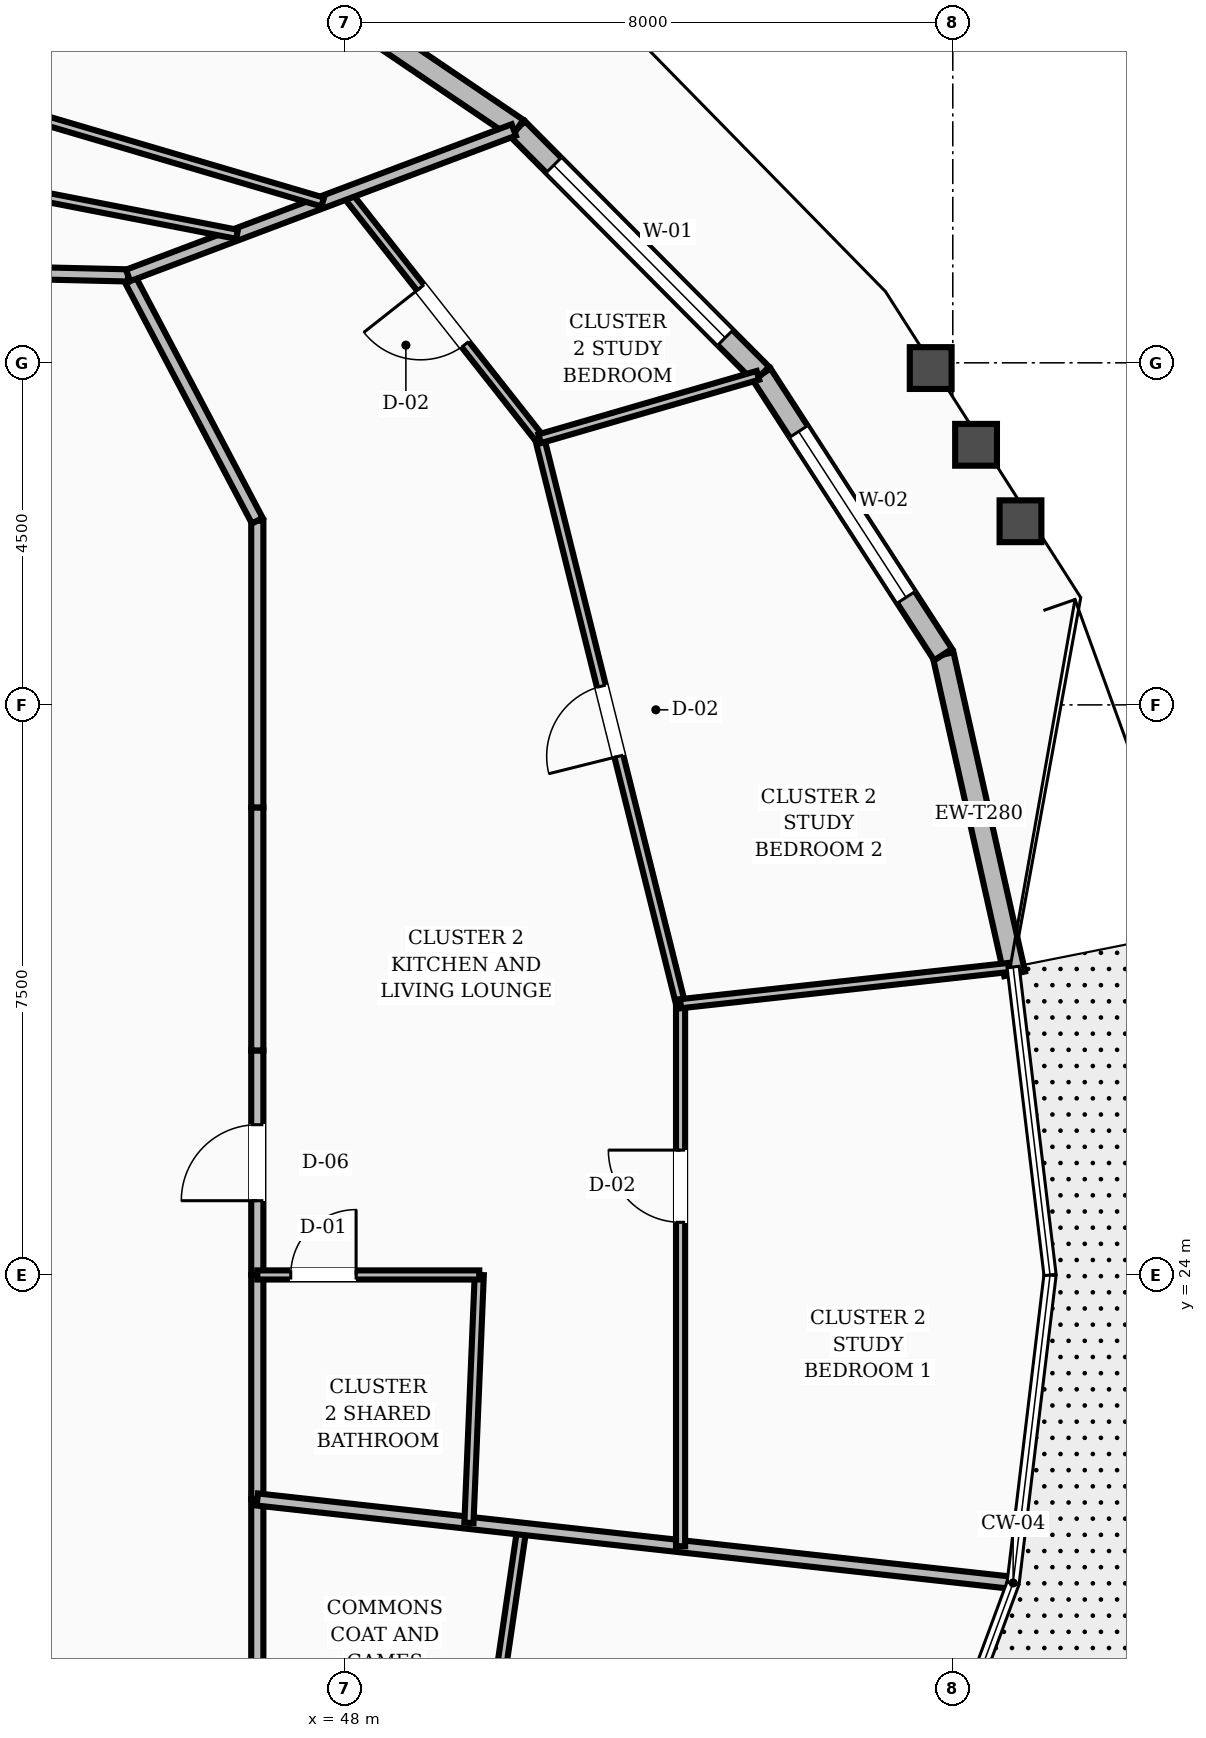
"""IFC4 building model, lengths in metres.
Left out: names, types, materials, properties, quantities, classifications, styles, units other than length and angle.
Written with IfcOpenShell. Run it as: python <this file> out.ifc"""

import sys

from ifc_helpers import new_model, si_unit, direction, frame, frame_2d, origin, place, context, subcontext, project, spatial, rectangle, extrude, element, fill, save


model = new_model("IFC4")
c1 = context("Model", 3, precision=1e-05, world=origin(), true_north=direction((0.0, 1.0)))
c2 = subcontext(c1, "Body", "Model", "MODEL_VIEW")
j1 = project(units=[si_unit("LENGTHUNIT", "METRE"), si_unit("PLANEANGLEUNIT", "RADIAN")], contexts=[c1])
p1 = place(None, origin())
s1 = spatial("IfcSite", under=j1, at=p1, CompositionType="ELEMENT")
p2 = place(p1, origin())
s2 = spatial("IfcBuilding", under=s1, at=p2, CompositionType="ELEMENT")
p3 = place(p2, frame((0.0, 0.0, 178.4)))
s3 = spatial("IfcBuildingStorey", under=s2, at=p3, CompositionType="ELEMENT", Elevation=178.4)
p4 = place(p3, frame((56.814, 27.962, 0.0), z_axis=(0.0, 0.0, 1.0), x_axis=(-0.218719837565, 0.975787698557, 0.0)))
e1 = element("IfcWall", 1, at=p4, inside=s3, PredefinedType="STANDARD", context=c2, shape_type="SweptSolid", body=[
    extrude(rectangle(XDim=4.304, YDim=0.28, at=frame_2d((2.152, 0.0))), origin(), (0.0, 0.0, 1.0), 2.82),
])
p5 = place(p3, frame((55.873, 32.162, 0.0), z_axis=(0.0, 0.0, 1.0), x_axis=(-0.543543905956, 0.839380737388, 0.0)))
e2 = element("IfcWall", 2, at=p5, inside=s3, PredefinedType="STANDARD", context=c2, shape_type="SweptSolid", body=[
    extrude(rectangle(XDim=4.393, YDim=0.28, at=frame_2d((2.196, 0.0))), origin(), (0.0, 0.0, 1.0), 2.82),
])
p6 = place(p5, frame((0.896, 0.0, 0.8)))
e3 = element("IfcOpeningElement", 3, at=p6, cuts=e2, PredefinedType="OPENING", context=c2, shape_type="SweptSolid", body=[
    extrude(rectangle(XDim=2.6, YDim=1.65, at=frame_2d((1.3, 0.825))), frame((0.0, 0.15, 0.0), z_axis=(0.0, -1.0, 0.0), x_axis=(1.0, 0.0, 0.0)), (0.0, 0.0, 1.0), 0.3),
])
p7 = place(p3, frame((53.485, 35.849, 0.0), z_axis=(0.0, 0.0, 1.0), x_axis=(-0.705095186085, 0.709112669862, 0.0)))
e4 = element("IfcWall", 4, at=p7, inside=s3, PredefinedType="STANDARD", context=c2, shape_type="SweptSolid", body=[
    extrude(rectangle(XDim=4.558, YDim=0.28, at=frame_2d((2.279, 0.0))), origin(), (0.0, 0.0, 1.0), 2.82),
])
p8 = place(p7, frame((0.679, 0.0, 0.8)))
e5 = element("IfcOpeningElement", 5, at=p8, cuts=e4, PredefinedType="OPENING", context=c2, shape_type="SweptSolid", body=[
    extrude(rectangle(XDim=3.2, YDim=1.65, at=frame_2d((1.6, 0.825))), frame((0.0, 0.15, 0.0), z_axis=(0.0, -1.0, 0.0), x_axis=(1.0, 0.0, 0.0)), (0.0, 0.0, 1.0), 0.3),
])
p9 = place(p3, frame((50.271, 39.081, 0.0), z_axis=(0.0, 0.0, 1.0), x_axis=(-0.827929515697, 0.560832164767, 0.0)))
e6 = element("IfcWall", 6, at=p9, inside=s3, PredefinedType="STANDARD", context=c2, shape_type="SweptSolid", body=[
    extrude(rectangle(XDim=4.729, YDim=0.28, at=frame_2d((2.365, 0.0))), origin(), (0.0, 0.0, 1.0), 2.82),
])
p10 = place(p3, frame((46.85, 24.0, 0.0), z_axis=(0.0, 0.0, 1.0), x_axis=(0.0, 1.0, 0.0)))
e7 = element("IfcWall", 7, at=p10, inside=s3, PredefinedType="SOLIDWALL", context=c2, shape_type="SweptSolid", body=[
    extrude(rectangle(XDim=2.954, YDim=0.16, at=frame_2d((1.477, 0.0))), origin(), (0.0, 0.0, 1.0), 2.8),
])
p11 = place(p10, frame((0.977, 0.0, 0.0)))
e8 = element("IfcOpeningElement", 8, at=p11, cuts=e7, PredefinedType="OPENING", context=c2, shape_type="SweptSolid", body=[
    extrude(rectangle(XDim=1.0, YDim=2.1, at=frame_2d((0.5, 1.05))), frame((0.0, 0.09, 0.0), z_axis=(0.0, -1.0, 0.0), x_axis=(1.0, 0.0, 0.0)), (0.0, 0.0, 1.0), 0.18),
])
p12 = place(p3, frame((46.85, 26.954, 0.0), z_axis=(0.0, 0.0, 1.0), x_axis=(0.0, 1.0, 0.0)))
e9 = element("IfcWall", 9, at=p12, inside=s3, PredefinedType="SOLIDWALL", context=c2, shape_type="SweptSolid", body=[
    extrude(rectangle(XDim=3.197, YDim=0.16, at=frame_2d((1.599, 0.0))), origin(), (0.0, 0.0, 1.0), 2.8),
])
p13 = place(p3, frame((46.85, 30.151, 0.0), z_axis=(0.0, 0.0, 1.0), x_axis=(0.0, 1.0, 0.0)))
e10 = element("IfcWall", 10, at=p13, inside=s3, PredefinedType="SOLIDWALL", context=c2, shape_type="SweptSolid", body=[
    extrude(rectangle(XDim=3.771, YDim=0.16, at=frame_2d((1.886, 0.0))), origin(), (0.0, 0.0, 1.0), 2.8),
])
p14 = place(p3, frame((46.85, 33.923, 0.0), z_axis=(0.0, 0.0, 1.0), x_axis=(-0.466093963429, 0.884735224378, 0.0)))
e11 = element("IfcWall", 11, at=p14, inside=s3, PredefinedType="SOLIDWALL", context=c2, shape_type="SweptSolid", body=[
    extrude(rectangle(XDim=3.648, YDim=0.16, at=frame_2d((1.824, 0.0))), origin(), (0.0, 0.0, 1.0), 2.8),
])
p15 = place(p3, frame((45.15, 37.15, 0.0), z_axis=(0.0, 0.0, 1.0), x_axis=(-0.999728709658, 0.023291781507, 0.0)))
e12 = element("IfcWall", 12, at=p15, inside=s3, PredefinedType="SOLIDWALL", context=c2, shape_type="SweptSolid", body=[
    extrude(rectangle(XDim=4.298, YDim=0.16, at=frame_2d((2.149, 0.0))), origin(), (0.0, 0.0, 1.0), 2.8),
])
p16 = place(p3, frame((46.85, 17.849, 0.0), z_axis=(0.0, 0.0, 1.0), x_axis=(0.0, 1.0, 0.0)))
e13 = element("IfcWall", 13, at=p16, inside=s3, PredefinedType="SOLIDWALL", context=c2, shape_type="SweptSolid", body=[
    extrude(rectangle(XDim=3.197, YDim=0.16, at=frame_2d((1.599, 0.0))), origin(), (0.0, 0.0, 1.0), 2.8),
])
p17 = place(p3, frame((46.85, 21.046, 0.0), z_axis=(0.0, 0.0, 1.0), x_axis=(0.0, 1.0, 0.0)))
e14 = element("IfcWall", 14, at=p17, inside=s3, PredefinedType="SOLIDWALL", context=c2, shape_type="SweptSolid", body=[
    extrude(rectangle(XDim=2.954, YDim=0.16, at=frame_2d((1.477, 0.0))), origin(), (0.0, 0.0, 1.0), 2.8),
])
p18 = place(p3, frame((49.827, 17.22, 0.0), z_axis=(0.0, 0.0, 1.0), x_axis=(0.144722086216, 0.989472343101, 0.0)))
e15 = element("IfcWall", 15, at=p18, inside=s3, PredefinedType="PARTITIONING", context=c2, shape_type="SweptSolid", body=[
    extrude(rectangle(XDim=3.479, YDim=0.12, at=frame_2d((1.739, 0.0))), origin(), (0.0, 0.0, 1.0), 2.8),
])
p19 = place(p3, frame((46.85, 21.046, 0.0), z_axis=(0.0, 0.0, 1.0), x_axis=(0.99396125521, -0.109731595909, 0.0)))
e16 = element("IfcWall", 16, at=p19, inside=s3, PredefinedType="SOLIDWALL", context=c2, shape_type="SweptSolid", body=[
    extrude(rectangle(XDim=9.954, YDim=0.16, at=frame_2d((4.977, 0.0))), origin(), (0.0, 0.0, 1.0), 2.8),
])
p20 = place(p3, frame((49.634, 20.739, 0.0), z_axis=(0.0, 0.0, 1.0), x_axis=(0.041661655892, 0.999131776308, 0.0)))
e17 = element("IfcWall", 17, at=p20, inside=s3, PredefinedType="PARTITIONING", context=c2, shape_type="SweptSolid", body=[
    extrude(rectangle(XDim=3.264, YDim=0.12, at=frame_2d((1.632, 0.0))), origin(), (0.0, 0.0, 1.0), 2.8),
])
p21 = place(p3, frame((46.85, 24.0, 0.0), z_axis=(0.0, 0.0, 1.0), x_axis=(1.0, 0.0, 0.0)))
e18 = element("IfcWall", 18, at=p21, inside=s3, PredefinedType="PARTITIONING", context=c2, shape_type="SweptSolid", body=[
    extrude(rectangle(XDim=2.92, YDim=0.12, at=frame_2d((1.46, 0.0))), origin(), (0.0, 0.0, 1.0), 2.8),
])
p22 = place(p21, frame((0.44, 0.0, 0.0)))
e19 = element("IfcOpeningElement", 19, at=p22, cuts=e18, PredefinedType="OPENING", context=c2, shape_type="SweptSolid", body=[
    extrude(rectangle(XDim=0.86, YDim=2.1, at=frame_2d((0.43, 1.05))), frame((0.0, 0.07, 0.0), z_axis=(0.0, -1.0, 0.0), x_axis=(1.0, 0.0, 0.0)), (0.0, 0.0, 1.0), 0.14),
])
p23 = place(p3, frame((52.418, 20.431, 0.0), z_axis=(0.0, 0.0, 1.0), x_axis=(0.0, 1.0, 0.0)))
e20 = element("IfcWall", 20, at=p23, inside=s3, PredefinedType="PARTITIONING", context=c2, shape_type="SweptSolid", body=[
    extrude(rectangle(XDim=7.137, YDim=0.12, at=frame_2d((3.569, 0.0))), origin(), (0.0, 0.0, 1.0), 2.8),
])
p24 = place(p23, frame((4.261, 0.0, 0.0)))
e21 = element("IfcOpeningElement", 21, at=p24, cuts=e20, PredefinedType="OPENING", context=c2, shape_type="SweptSolid", body=[
    extrude(rectangle(XDim=0.95, YDim=2.1, at=frame_2d((0.475, 1.05))), frame((0.0, 0.07, 0.0), z_axis=(0.0, -1.0, 0.0), x_axis=(1.0, 0.0, 0.0)), (0.0, 0.0, 1.0), 0.14),
])
p25 = place(p3, frame((52.418, 27.569, 0.0), z_axis=(0.0, 0.0, 1.0), x_axis=(-0.24189815988, 0.970301643947, 0.0)))
e22 = element("IfcWall", 22, at=p25, inside=s3, PredefinedType="PARTITIONING", context=c2, shape_type="SweptSolid", body=[
    extrude(rectangle(XDim=7.66, YDim=0.12, at=frame_2d((3.83, 0.0))), origin(), (0.0, 0.0, 1.0), 2.8),
])
p26 = place(p25, frame((3.355, 0.0, 0.0)))
e23 = element("IfcOpeningElement", 23, at=p26, cuts=e22, PredefinedType="OPENING", context=c2, shape_type="SweptSolid", body=[
    extrude(rectangle(XDim=0.95, YDim=2.1, at=frame_2d((0.475, 1.05))), frame((0.0, 0.07, 0.0), z_axis=(0.0, -1.0, 0.0), x_axis=(1.0, 0.0, 0.0)), (0.0, 0.0, 1.0), 0.14),
])
p27 = place(p3, frame((52.418, 27.569, 0.0), z_axis=(0.0, 0.0, 1.0), x_axis=(0.993961478056, 0.109729577327, 0.0)))
e24 = element("IfcWall", 24, at=p27, inside=s3, PredefinedType="PARTITIONING", context=c2, shape_type="SweptSolid", body=[
    extrude(rectangle(XDim=4.352, YDim=0.12, at=frame_2d((2.176, 0.0))), origin(), (0.0, 0.0, 1.0), 2.8),
])
p28 = place(p3, frame((50.565, 35.001, 0.0), z_axis=(0.0, 0.0, 1.0), x_axis=(-0.619288242801, 0.785163723263, 0.0)))
e25 = element("IfcWall", 25, at=p28, inside=s3, PredefinedType="PARTITIONING", context=c2, shape_type="SweptSolid", body=[
    extrude(rectangle(XDim=4.114, YDim=0.12, at=frame_2d((2.057, 0.0))), origin(), (0.0, 0.0, 1.0), 2.8),
])
p29 = place(p28, frame((1.582, 0.0, 0.0)))
e26 = element("IfcOpeningElement", 26, at=p29, cuts=e25, PredefinedType="OPENING", context=c2, shape_type="SweptSolid", body=[
    extrude(rectangle(XDim=0.95, YDim=2.1, at=frame_2d((0.475, 1.05))), frame((0.0, 0.07, 0.0), z_axis=(0.0, -1.0, 0.0), x_axis=(1.0, 0.0, 0.0)), (0.0, 0.0, 1.0), 0.14),
])
p30 = place(p3, frame((50.565, 35.001, 0.0), z_axis=(0.0, 0.0, 1.0), x_axis=(0.960334941703, 0.278849062657, 0.0)))
e27 = element("IfcWall", 27, at=p30, inside=s3, PredefinedType="PARTITIONING", context=c2, shape_type="SweptSolid", body=[
    extrude(rectangle(XDim=2.99, YDim=0.12, at=frame_2d((1.495, 0.0))), origin(), (0.0, 0.0, 1.0), 2.8),
])
p31 = place(p3, frame((45.15, 37.15, 0.0), z_axis=(0.0, 0.0, 1.0), x_axis=(0.935687541553, 0.3528297388, 0.0)))
e28 = element("IfcWall", 28, at=p31, inside=s3, PredefinedType="SOLIDWALL", context=c2, shape_type="SweptSolid", body=[
    extrude(rectangle(XDim=5.424, YDim=0.16, at=frame_2d((2.712, 0.0))), origin(), (0.0, 0.0, 1.0), 2.8),
])
p32 = place(p3, frame((46.584, 37.691, 0.0), z_axis=(0.0, 0.0, 1.0), x_axis=(-0.981615985024, 0.190866597251, 0.0)))
e29 = element("IfcWall", 29, at=p32, inside=s3, PredefinedType="PARTITIONING", context=c2, shape_type="SweptSolid", body=[
    extrude(rectangle(XDim=4.268, YDim=0.12, at=frame_2d((2.134, 0.0))), origin(), (0.0, 0.0, 1.0), 2.8),
])
p33 = place(p3, frame((47.711, 38.115, 0.0), z_axis=(0.0, 0.0, 1.0), x_axis=(-0.959292020944, 0.282416038059, 0.0)))
e30 = element("IfcWall", 30, at=p33, inside=s3, PredefinedType="PARTITIONING", context=c2, shape_type="SweptSolid", body=[
    extrude(rectangle(XDim=8.363, YDim=0.12, at=frame_2d((4.181, 0.0))), origin(), (0.0, 0.0, 1.0), 2.8),
])
p34 = place(p33, frame((5.144, 0.0, 0.0)))
e31 = element("IfcOpeningElement", 31, at=p34, cuts=e30, PredefinedType="OPENING", context=c2, shape_type="SweptSolid", body=[
    extrude(rectangle(XDim=0.95, YDim=2.1, at=frame_2d((0.475, 1.05))), frame((0.0, 0.07, 0.0), z_axis=(0.0, -1.0, 0.0), x_axis=(1.0, 0.0, 0.0)), (0.0, 0.0, 1.0), 0.14),
])
p35 = place(p6, origin())
e32 = element("IfcWindow", 32, at=p35, inside=s3, PartitioningType="SINGLE_PANEL", PredefinedType="WINDOW", context=c2, shape_type="SweptSolid", body=[
    extrude(rectangle(XDim=2.6, YDim=1.65, at=frame_2d((1.3, 0.825))), frame((0.0, 0.03, 0.0), z_axis=(0.0, -1.0, 0.0), x_axis=(1.0, 0.0, 0.0)), (0.0, 0.0, 1.0), 0.06),
])
fill(e3, e32)
p36 = place(p8, origin())
e33 = element("IfcWindow", 33, at=p36, inside=s3, PartitioningType="SINGLE_PANEL", PredefinedType="WINDOW", context=c2, shape_type="SweptSolid", body=[
    extrude(rectangle(XDim=3.2, YDim=1.65, at=frame_2d((1.6, 0.825))), frame((0.0, 0.03, 0.0), z_axis=(0.0, -1.0, 0.0), x_axis=(1.0, 0.0, 0.0)), (0.0, 0.0, 1.0), 0.06),
])
fill(e5, e33)
p37 = place(p22, origin())
e34 = element("IfcDoor", 34, at=p37, inside=s3, OperationType="SINGLE_SWING_RIGHT", PredefinedType="DOOR", context=c2, shape_type="SweptSolid", body=[
    extrude(rectangle(XDim=0.86, YDim=2.1, at=frame_2d((0.43, 1.05))), frame((0.0, 0.025, 0.0), z_axis=(0.0, -1.0, 0.0), x_axis=(1.0, 0.0, 0.0)), (0.0, 0.0, 1.0), 0.05),
])
fill(e19, e34)
p38 = place(p11, origin())
e35 = element("IfcDoor", 35, at=p38, inside=s3, OperationType="SINGLE_SWING_LEFT", PredefinedType="DOOR", context=c2, shape_type="SweptSolid", body=[
    extrude(rectangle(XDim=1.0, YDim=2.1, at=frame_2d((0.5, 1.05))), frame((0.0, 0.025, 0.0), z_axis=(0.0, -1.0, 0.0), x_axis=(1.0, 0.0, 0.0)), (0.0, 0.0, 1.0), 0.05),
])
fill(e8, e35)
p39 = place(p24, origin())
e36 = element("IfcDoor", 36, at=p39, inside=s3, OperationType="SINGLE_SWING_RIGHT", PredefinedType="DOOR", context=c2, shape_type="SweptSolid", body=[
    extrude(rectangle(XDim=0.95, YDim=2.1, at=frame_2d((0.475, 1.05))), frame((0.0, 0.025, 0.0), z_axis=(0.0, -1.0, 0.0), x_axis=(1.0, 0.0, 0.0)), (0.0, 0.0, 1.0), 0.05),
])
fill(e21, e36)
p40 = place(p26, origin())
e37 = element("IfcDoor", 37, at=p40, inside=s3, OperationType="SINGLE_SWING_LEFT", PredefinedType="DOOR", context=c2, shape_type="SweptSolid", body=[
    extrude(rectangle(XDim=0.95, YDim=2.1, at=frame_2d((0.475, 1.05))), frame((0.0, 0.025, 0.0), z_axis=(0.0, -1.0, 0.0), x_axis=(1.0, 0.0, 0.0)), (0.0, 0.0, 1.0), 0.05),
])
fill(e23, e37)
p41 = place(p29, origin())
e38 = element("IfcDoor", 38, at=p41, inside=s3, OperationType="SINGLE_SWING_RIGHT", PredefinedType="DOOR", context=c2, shape_type="SweptSolid", body=[
    extrude(rectangle(XDim=0.95, YDim=2.1, at=frame_2d((0.475, 1.05))), frame((0.0, 0.025, 0.0), z_axis=(0.0, -1.0, 0.0), x_axis=(1.0, 0.0, 0.0)), (0.0, 0.0, 1.0), 0.05),
])
fill(e26, e38)
save(model, sys.argv[1])
